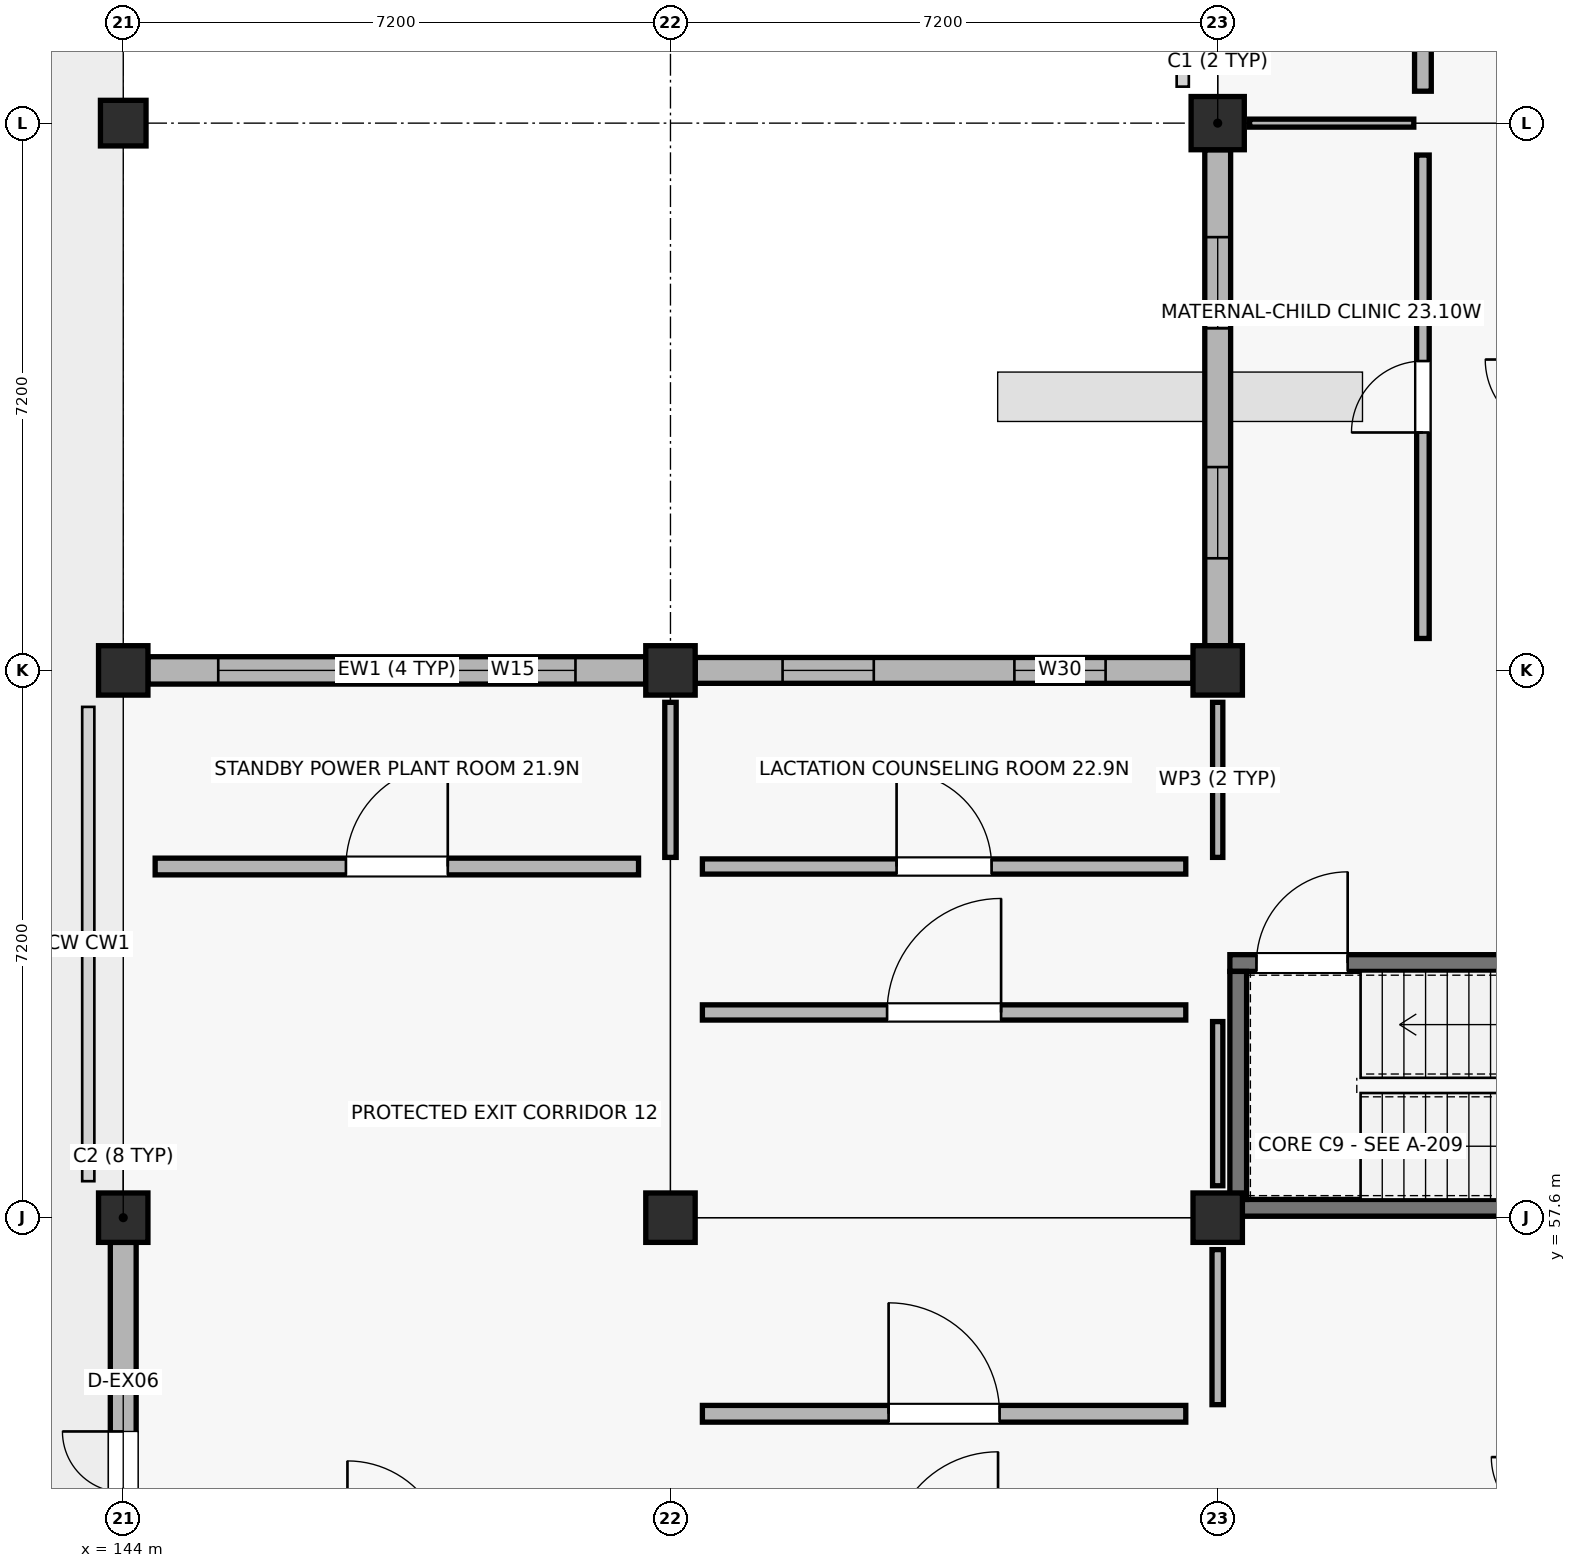
"""IFC4 building model, lengths in metres.
Left out: names, types, materials, properties, quantities, classifications, styles, units other than length and angle.
Written with IfcOpenShell. Run it as: python <this file> out.ifc"""

import sys

from ifc_helpers import new_model, si_unit, direction, frame, frame_2d, origin, origin_2d, place, context, subcontext, project, spatial, rectangle, extrude, element, fill, save


model = new_model("IFC4")
c1 = context("Model", 3, precision=1e-05, world=origin(), true_north=direction((0.0, 1.0)))
c2 = subcontext(c1, "Body", "Model", "MODEL_VIEW")
j1 = project(units=[si_unit("LENGTHUNIT", "METRE"), si_unit("PLANEANGLEUNIT", "RADIAN")], contexts=[c1])
p1 = place(None, origin())
s1 = spatial("IfcSite", under=j1, at=p1, CompositionType="ELEMENT")
p2 = place(p1, origin())
s2 = spatial("IfcBuilding", under=s1, at=p2, CompositionType="ELEMENT")
p3 = place(p2, origin())
s3 = spatial("IfcBuildingStorey", under=s2, at=p3, CompositionType="ELEMENT", Elevation=0.0)
for number, where, z_axis, x_axis in (
    (1, (144.0, 57.6, -0.25), (0.0, 0.0, 1.0), (1.0, 0.0, 0.0)),
    (2, (144.0, 64.8, -0.25), (0.0, 0.0, 1.0), (1.0, 0.0, 0.0)),
):
    element("IfcColumn", number, at=place(p3, frame(where, z_axis=z_axis, x_axis=x_axis)), inside=s3, PredefinedType="COLUMN", context=c2, shape_type="SweptSolid", body=[
        extrude(rectangle(XDim=0.65, YDim=0.65, at=origin_2d()), origin(), (0.0, 0.0, 1.0), 4.75),
    ])
p4 = place(p3, frame((144.0, 72.0, -0.25), z_axis=(0.0, 0.0, 1.0), x_axis=(1.0, 0.0, 0.0)))
e3 = element("IfcColumn", 3, at=p4, inside=s3, PredefinedType="COLUMN", context=c2, shape_type="SweptSolid", body=[
    extrude(rectangle(XDim=0.6, YDim=0.6, at=origin_2d()), origin(), (0.0, 0.0, 1.0), 4.75),
])
for number, where, z_axis, x_axis in (
    (4, (151.2, 57.6, -0.25), (0.0, 0.0, 1.0), (1.0, 0.0, 0.0)),
    (5, (151.2, 64.8, -0.25), (0.0, 0.0, 1.0), (1.0, 0.0, 0.0)),
    (6, (158.4, 57.6, -0.25), (0.0, 0.0, 1.0), (1.0, 0.0, 0.0)),
    (7, (158.4, 64.8, -0.25), (0.0, 0.0, 1.0), (1.0, 0.0, 0.0)),
):
    element("IfcColumn", number, at=place(p3, frame(where, z_axis=z_axis, x_axis=x_axis)), inside=s3, PredefinedType="COLUMN", context=c2, shape_type="SweptSolid", body=[
        extrude(rectangle(XDim=0.65, YDim=0.65, at=origin_2d()), origin(), (0.0, 0.0, 1.0), 4.75),
    ])
p5 = place(p3, frame((158.4, 72.0, -0.25), z_axis=(0.0, 0.0, 1.0), x_axis=(1.0, 0.0, 0.0)))
e8 = element("IfcColumn", 8, at=p5, inside=s3, PredefinedType="COLUMN", context=c2, shape_type="SweptSolid", body=[
    extrude(rectangle(XDim=0.7, YDim=0.7, at=origin_2d()), origin(), (0.0, 0.0, 1.0), 4.75),
])
p6 = place(p3, frame((144.0, 50.7, 0.0), z_axis=(0.0, 0.0, 1.0), x_axis=(0.0, 1.0, 0.0)))
e9 = element("IfcWall", 9, at=p6, inside=s3, PredefinedType="SOLIDWALL", context=c2, shape_type="SweptSolid", body=[
    extrude(rectangle(XDim=6.575, YDim=0.34, at=frame_2d((3.288, 0.0))), origin(), (0.0, 0.0, 1.0), 3.52),
])
p7 = place(p6, frame((2.488, 0.0, 0.0)))
e10 = element("IfcOpeningElement", 10, at=p7, cuts=e9, PredefinedType="OPENING", context=c2, shape_type="SweptSolid", body=[
    extrude(rectangle(XDim=1.6, YDim=2.25, at=frame_2d((0.8, 1.125))), frame((0.0, 0.18, 0.0), z_axis=(0.0, -1.0, 0.0), x_axis=(1.0, 0.0, 0.0)), (0.0, 0.0, 1.0), 0.36),
])
p8 = place(p3, frame((150.875, 64.8, 0.0), z_axis=(0.0, 0.0, 1.0), x_axis=(-1.0, 0.0, 0.0)))
e11 = element("IfcWall", 11, at=p8, inside=s3, PredefinedType="SOLIDWALL", context=c2, shape_type="SweptSolid", body=[
    extrude(rectangle(XDim=6.55, YDim=0.36, at=frame_2d((3.275, 0.0))), origin(), (0.0, 0.0, 1.0), 3.47),
])
p9 = place(p8, frame((0.925, 0.0, 0.9)))
e12 = element("IfcOpeningElement", 12, at=p9, cuts=e11, PredefinedType="OPENING", context=c2, shape_type="SweptSolid", body=[
    extrude(rectangle(XDim=1.65, YDim=1.38, at=frame_2d((0.825, 0.69))), frame((0.0, 0.19, 0.0), z_axis=(0.0, -1.0, 0.0), x_axis=(1.0, 0.0, 0.0)), (0.0, 0.0, 1.0), 0.38),
])
p10 = place(p8, frame((3.975, 0.0, 0.9)))
e13 = element("IfcOpeningElement", 13, at=p10, cuts=e11, PredefinedType="OPENING", context=c2, shape_type="SweptSolid", body=[
    extrude(rectangle(XDim=1.65, YDim=1.38, at=frame_2d((0.825, 0.69))), frame((0.0, 0.19, 0.0), z_axis=(0.0, -1.0, 0.0), x_axis=(1.0, 0.0, 0.0)), (0.0, 0.0, 1.0), 0.38),
])
p11 = place(p3, frame((158.075, 64.8, 0.0), z_axis=(0.0, 0.0, 1.0), x_axis=(-1.0, 0.0, 0.0)))
e14 = element("IfcWall", 14, at=p11, inside=s3, PredefinedType="SOLIDWALL", context=c2, shape_type="SweptSolid", body=[
    extrude(rectangle(XDim=6.55, YDim=0.34, at=frame_2d((3.275, 0.0))), origin(), (0.0, 0.0, 1.0), 3.47),
])
p12 = place(p11, frame((1.15, 0.0, 0.9)))
e15 = element("IfcOpeningElement", 15, at=p12, cuts=e14, PredefinedType="OPENING", context=c2, shape_type="SweptSolid", body=[
    extrude(rectangle(XDim=1.2, YDim=1.62, at=frame_2d((0.6, 0.81))), frame((0.0, 0.18, 0.0), z_axis=(0.0, -1.0, 0.0), x_axis=(1.0, 0.0, 0.0)), (0.0, 0.0, 1.0), 0.36),
])
p13 = place(p11, frame((4.2, 0.0, 0.9)))
e16 = element("IfcOpeningElement", 16, at=p13, cuts=e14, PredefinedType="OPENING", context=c2, shape_type="SweptSolid", body=[
    extrude(rectangle(XDim=1.2, YDim=1.62, at=frame_2d((0.6, 0.81))), frame((0.0, 0.18, 0.0), z_axis=(0.0, -1.0, 0.0), x_axis=(1.0, 0.0, 0.0)), (0.0, 0.0, 1.0), 0.36),
])
p14 = place(p3, frame((158.4, 71.65, 0.0), z_axis=(0.0, 0.0, 1.0), x_axis=(0.0, -1.0, 0.0)))
e17 = element("IfcWall", 17, at=p14, inside=s3, PredefinedType="SOLIDWALL", context=c2, shape_type="SweptSolid", body=[
    extrude(rectangle(XDim=6.525, YDim=0.34, at=frame_2d((3.262, 0.0))), origin(), (0.0, 0.0, 1.0), 3.52),
])
p15 = place(p14, frame((1.15, 0.0, 0.9)))
e18 = element("IfcOpeningElement", 18, at=p15, cuts=e17, PredefinedType="OPENING", context=c2, shape_type="SweptSolid", body=[
    extrude(rectangle(XDim=1.2, YDim=1.38, at=frame_2d((0.6, 0.69))), frame((0.0, 0.18, 0.0), z_axis=(0.0, -1.0, 0.0), x_axis=(1.0, 0.0, 0.0)), (0.0, 0.0, 1.0), 0.36),
])
p16 = place(p14, frame((4.175, 0.0, 0.9)))
e19 = element("IfcOpeningElement", 19, at=p16, cuts=e17, PredefinedType="OPENING", context=c2, shape_type="SweptSolid", body=[
    extrude(rectangle(XDim=1.2, YDim=1.38, at=frame_2d((0.6, 0.69))), frame((0.0, 0.18, 0.0), z_axis=(0.0, -1.0, 0.0), x_axis=(1.0, 0.0, 0.0)), (0.0, 0.0, 1.0), 0.36),
])
p17 = place(p3, frame((158.56, 57.73, -0.25), z_axis=(0.0, 0.0, 1.0), x_axis=(1.0, 0.0, 0.0)))
e20 = element("IfcWall", 20, at=p17, inside=s3, PredefinedType="SHEAR", context=c2, shape_type="SweptSolid", body=[
    extrude(rectangle(XDim=6.88, YDim=0.22, at=frame_2d((3.44, 0.0))), origin(), (0.0, 0.0, 1.0), 4.47),
])
p18 = place(p3, frame((158.56, 60.95, -0.25), z_axis=(0.0, 0.0, 1.0), x_axis=(1.0, 0.0, 0.0)))
e21 = element("IfcWall", 21, at=p18, inside=s3, PredefinedType="SHEAR", context=c2, shape_type="SweptSolid", body=[
    extrude(rectangle(XDim=6.88, YDim=0.22, at=frame_2d((3.44, 0.0))), origin(), (0.0, 0.0, 1.0), 4.47),
])
p19 = place(p18, frame((0.35, 0.0, 0.25)))
e22 = element("IfcOpeningElement", 22, at=p19, cuts=e21, PredefinedType="OPENING", context=c2, shape_type="SweptSolid", body=[
    extrude(rectangle(XDim=1.2, YDim=2.15, at=frame_2d((0.6, 1.075))), frame((0.0, 0.12, 0.0), z_axis=(0.0, -1.0, 0.0), x_axis=(1.0, 0.0, 0.0)), (0.0, 0.0, 1.0), 0.24),
])
p20 = place(p3, frame((158.67, 57.84, -0.25), z_axis=(0.0, 0.0, 1.0), x_axis=(0.0, 1.0, 0.0)))
e23 = element("IfcWall", 23, at=p20, inside=s3, PredefinedType="SHEAR", context=c2, shape_type="SweptSolid", body=[
    extrude(rectangle(XDim=3.0, YDim=0.22, at=frame_2d((1.5, 0.0))), origin(), (0.0, 0.0, 1.0), 4.47),
])
p21 = place(p3, frame((144.42, 62.22, 0.0), z_axis=(0.0, 0.0, 1.0), x_axis=(1.0, 0.0, 0.0)))
e24 = element("IfcWall", 24, at=p21, inside=s3, PredefinedType="SOLIDWALL", context=c2, shape_type="SweptSolid", body=[
    extrude(rectangle(XDim=6.36, YDim=0.22, at=frame_2d((3.18, 0.0))), origin(), (0.0, 0.0, 1.0), 3.36),
])
p22 = place(p21, frame((2.51, 0.0, 0.0)))
e25 = element("IfcOpeningElement", 25, at=p22, cuts=e24, PredefinedType="OPENING", context=c2, shape_type="SweptSolid", body=[
    extrude(rectangle(XDim=1.34, YDim=2.19, at=frame_2d((0.67, 1.095))), frame((0.0, 0.12, 0.0), z_axis=(0.0, -1.0, 0.0), x_axis=(1.0, 0.0, 0.0)), (0.0, 0.0, 1.0), 0.24),
])
p23 = place(p3, frame((151.2, 62.34, 0.0), z_axis=(0.0, 0.0, 1.0), x_axis=(0.0, 1.0, 0.0)))
e26 = element("IfcWall", 26, at=p23, inside=s3, PredefinedType="PARTITIONING", context=c2, shape_type="SweptSolid", body=[
    extrude(rectangle(XDim=2.04, YDim=0.15, at=frame_2d((1.02, 0.0))), origin(), (0.0, 0.0, 1.0), 3.36),
])
p24 = place(p3, frame((151.62, 55.02, 0.0), z_axis=(0.0, 0.0, 1.0), x_axis=(1.0, 0.0, 0.0)))
e27 = element("IfcWall", 27, at=p24, inside=s3, PredefinedType="SOLIDWALL", context=c2, shape_type="SweptSolid", body=[
    extrude(rectangle(XDim=6.36, YDim=0.22, at=frame_2d((3.18, 0.0))), origin(), (0.0, 0.0, 1.0), 3.36),
])
p25 = place(p24, frame((2.45, 0.0, 0.0)))
e28 = element("IfcOpeningElement", 28, at=p25, cuts=e27, PredefinedType="OPENING", context=c2, shape_type="SweptSolid", body=[
    extrude(rectangle(XDim=1.46, YDim=2.19, at=frame_2d((0.73, 1.095))), frame((0.0, 0.12, 0.0), z_axis=(0.0, -1.0, 0.0), x_axis=(1.0, 0.0, 0.0)), (0.0, 0.0, 1.0), 0.24),
])
p26 = place(p3, frame((158.4, 55.14, 0.0), z_axis=(0.0, 0.0, 1.0), x_axis=(0.0, 1.0, 0.0)))
e29 = element("IfcWall", 29, at=p26, inside=s3, PredefinedType="PARTITIONING", context=c2, shape_type="SweptSolid", body=[
    extrude(rectangle(XDim=2.04, YDim=0.15, at=frame_2d((1.02, 0.0))), origin(), (0.0, 0.0, 1.0), 3.36),
])
p27 = place(p3, frame((151.62, 60.3, 0.0), z_axis=(0.0, 0.0, 1.0), x_axis=(1.0, 0.0, 0.0)))
e30 = element("IfcWall", 30, at=p27, inside=s3, PredefinedType="SOLIDWALL", context=c2, shape_type="SweptSolid", body=[
    extrude(rectangle(XDim=6.36, YDim=0.2, at=frame_2d((3.18, 0.0))), origin(), (0.0, 0.0, 1.0), 3.36),
])
p28 = place(p27, frame((2.43, 0.0, 0.0)))
e31 = element("IfcOpeningElement", 31, at=p28, cuts=e30, PredefinedType="OPENING", context=c2, shape_type="SweptSolid", body=[
    extrude(rectangle(XDim=1.5, YDim=2.19, at=frame_2d((0.75, 1.095))), frame((0.0, 0.11, 0.0), z_axis=(0.0, -1.0, 0.0), x_axis=(1.0, 0.0, 0.0)), (0.0, 0.0, 1.0), 0.22),
])
p29 = place(p3, frame((158.4, 58.02, 0.0), z_axis=(0.0, 0.0, 1.0), x_axis=(0.0, 1.0, 0.0)))
e32 = element("IfcWall", 32, at=p29, inside=s3, PredefinedType="PARTITIONING", context=c2, shape_type="SweptSolid", body=[
    extrude(rectangle(XDim=2.16, YDim=0.135, at=frame_2d((1.08, 0.0))), origin(), (0.0, 0.0, 1.0), 3.36),
])
p30 = place(p3, frame((151.62, 62.22, 0.0), z_axis=(0.0, 0.0, 1.0), x_axis=(1.0, 0.0, 0.0)))
e33 = element("IfcWall", 33, at=p30, inside=s3, PredefinedType="SOLIDWALL", context=c2, shape_type="SweptSolid", body=[
    extrude(rectangle(XDim=6.36, YDim=0.2, at=frame_2d((3.18, 0.0))), origin(), (0.0, 0.0, 1.0), 3.36),
])
p31 = place(p30, frame((2.555, 0.0, 0.0)))
e34 = element("IfcOpeningElement", 34, at=p31, cuts=e33, PredefinedType="OPENING", context=c2, shape_type="SweptSolid", body=[
    extrude(rectangle(XDim=1.25, YDim=2.15, at=frame_2d((0.625, 1.075))), frame((0.0, 0.11, 0.0), z_axis=(0.0, -1.0, 0.0), x_axis=(1.0, 0.0, 0.0)), (0.0, 0.0, 1.0), 0.22),
])
p32 = place(p3, frame((158.4, 62.34, 0.0), z_axis=(0.0, 0.0, 1.0), x_axis=(0.0, 1.0, 0.0)))
e35 = element("IfcWall", 35, at=p32, inside=s3, PredefinedType="PARTITIONING", context=c2, shape_type="SweptSolid", body=[
    extrude(rectangle(XDim=2.04, YDim=0.135, at=frame_2d((1.02, 0.0))), origin(), (0.0, 0.0, 1.0), 3.36),
])
p33 = place(p3, frame((161.1, 65.22, 0.0), z_axis=(0.0, 0.0, 1.0), x_axis=(0.0, 1.0, 0.0)))
e36 = element("IfcWall", 36, at=p33, inside=s3, PredefinedType="PARTITIONING", context=c2, shape_type="SweptSolid", body=[
    extrude(rectangle(XDim=6.36, YDim=0.165, at=frame_2d((3.18, 0.0))), origin(), (0.0, 0.0, 1.0), 3.36),
])
p34 = place(p33, frame((2.71, 0.0, 0.0)))
e37 = element("IfcOpeningElement", 37, at=p34, cuts=e36, PredefinedType="OPENING", context=c2, shape_type="SweptSolid", body=[
    extrude(rectangle(XDim=0.94, YDim=2.04, at=frame_2d((0.47, 1.02))), frame((0.0, 0.093, 0.0), z_axis=(0.0, -1.0, 0.0), x_axis=(1.0, 0.0, 0.0)), (0.0, 0.0, 1.0), 0.185),
])
p35 = place(p3, frame((158.82, 72.0, 0.0), z_axis=(0.0, 0.0, 1.0), x_axis=(1.0, 0.0, 0.0)))
e38 = element("IfcWall", 38, at=p35, inside=s3, PredefinedType="PARTITIONING", context=c2, shape_type="SweptSolid", body=[
    extrude(rectangle(XDim=2.16, YDim=0.105, at=frame_2d((1.08, 0.0))), origin(), (0.0, 0.0, 1.0), 3.36),
])
p36 = place(p3, frame((161.1, 72.42, 0.0), z_axis=(0.0, 0.0, 1.0), x_axis=(0.0, 1.0, 0.0)))
e39 = element("IfcWall", 39, at=p36, inside=s3, PredefinedType="SOLIDWALL", context=c2, shape_type="SweptSolid", body=[
    extrude(rectangle(XDim=6.36, YDim=0.22, at=frame_2d((3.18, 0.0))), origin(), (0.0, 0.0, 1.0), 3.36),
])
p37 = place(p36, frame((2.67, 0.0, 0.0)))
e40 = element("IfcOpeningElement", 40, at=p37, cuts=e39, PredefinedType="OPENING", context=c2, shape_type="SweptSolid", body=[
    extrude(rectangle(XDim=1.02, YDim=2.04, at=frame_2d((0.51, 1.02))), frame((0.0, 0.12, 0.0), z_axis=(0.0, -1.0, 0.0), x_axis=(1.0, 0.0, 0.0)), (0.0, 0.0, 1.0), 0.24),
])
p38 = place(p7, origin())
e41 = element("IfcDoor", 41, at=p38, inside=s3, OperationType="DOUBLE_DOOR_SINGLE_SWING", PredefinedType="DOOR", context=c2, shape_type="SweptSolid", body=[
    extrude(rectangle(XDim=1.6, YDim=2.25, at=frame_2d((0.8, 1.125))), frame((0.0, 0.025, 0.0), z_axis=(0.0, -1.0, 0.0), x_axis=(1.0, 0.0, 0.0)), (0.0, 0.0, 1.0), 0.05),
])
fill(e10, e41)
p39 = place(p9, origin())
e42 = element("IfcWindow", 42, at=p39, inside=s3, PartitioningType="SINGLE_PANEL", PredefinedType="WINDOW", context=c2, shape_type="SweptSolid", body=[
    extrude(rectangle(XDim=1.65, YDim=1.38, at=frame_2d((0.825, 0.69))), frame((0.0, 0.03, 0.0), z_axis=(0.0, -1.0, 0.0), x_axis=(1.0, 0.0, 0.0)), (0.0, 0.0, 1.0), 0.06),
])
fill(e12, e42)
p40 = place(p10, origin())
e43 = element("IfcWindow", 43, at=p40, inside=s3, PartitioningType="SINGLE_PANEL", PredefinedType="WINDOW", context=c2, shape_type="SweptSolid", body=[
    extrude(rectangle(XDim=1.65, YDim=1.38, at=frame_2d((0.825, 0.69))), frame((0.0, 0.03, 0.0), z_axis=(0.0, -1.0, 0.0), x_axis=(1.0, 0.0, 0.0)), (0.0, 0.0, 1.0), 0.06),
])
fill(e13, e43)
p41 = place(p12, origin())
e44 = element("IfcWindow", 44, at=p41, inside=s3, PartitioningType="SINGLE_PANEL", PredefinedType="WINDOW", context=c2, shape_type="SweptSolid", body=[
    extrude(rectangle(XDim=1.2, YDim=1.62, at=frame_2d((0.6, 0.81))), frame((0.0, 0.03, 0.0), z_axis=(0.0, -1.0, 0.0), x_axis=(1.0, 0.0, 0.0)), (0.0, 0.0, 1.0), 0.06),
])
fill(e15, e44)
p42 = place(p13, origin())
e45 = element("IfcWindow", 45, at=p42, inside=s3, PartitioningType="SINGLE_PANEL", PredefinedType="WINDOW", context=c2, shape_type="SweptSolid", body=[
    extrude(rectangle(XDim=1.2, YDim=1.62, at=frame_2d((0.6, 0.81))), frame((0.0, 0.03, 0.0), z_axis=(0.0, -1.0, 0.0), x_axis=(1.0, 0.0, 0.0)), (0.0, 0.0, 1.0), 0.06),
])
fill(e16, e45)
p43 = place(p15, origin())
e46 = element("IfcWindow", 46, at=p43, inside=s3, PartitioningType="SINGLE_PANEL", PredefinedType="WINDOW", context=c2, shape_type="SweptSolid", body=[
    extrude(rectangle(XDim=1.2, YDim=1.38, at=frame_2d((0.6, 0.69))), frame((0.0, 0.03, 0.0), z_axis=(0.0, -1.0, 0.0), x_axis=(1.0, 0.0, 0.0)), (0.0, 0.0, 1.0), 0.06),
])
fill(e18, e46)
p44 = place(p16, origin())
e47 = element("IfcWindow", 47, at=p44, inside=s3, PartitioningType="SINGLE_PANEL", PredefinedType="WINDOW", context=c2, shape_type="SweptSolid", body=[
    extrude(rectangle(XDim=1.2, YDim=1.38, at=frame_2d((0.6, 0.69))), frame((0.0, 0.03, 0.0), z_axis=(0.0, -1.0, 0.0), x_axis=(1.0, 0.0, 0.0)), (0.0, 0.0, 1.0), 0.06),
])
fill(e19, e47)
p45 = place(p19, origin())
e48 = element("IfcDoor", 48, at=p45, inside=s3, OperationType="SINGLE_SWING_RIGHT", PredefinedType="DOOR", context=c2, shape_type="SweptSolid", body=[
    extrude(rectangle(XDim=1.2, YDim=2.15, at=frame_2d((0.6, 1.075))), frame((0.0, 0.025, 0.0), z_axis=(0.0, -1.0, 0.0), x_axis=(1.0, 0.0, 0.0)), (0.0, 0.0, 1.0), 0.05),
])
fill(e22, e48)
p46 = place(p22, origin())
e49 = element("IfcDoor", 49, at=p46, inside=s3, OperationType="SINGLE_SWING_RIGHT", PredefinedType="DOOR", context=c2, shape_type="SweptSolid", body=[
    extrude(rectangle(XDim=1.34, YDim=2.19, at=frame_2d((0.67, 1.095))), frame((0.0, 0.025, 0.0), z_axis=(0.0, -1.0, 0.0), x_axis=(1.0, 0.0, 0.0)), (0.0, 0.0, 1.0), 0.05),
])
fill(e25, e49)
p47 = place(p25, origin())
e50 = element("IfcDoor", 50, at=p47, inside=s3, OperationType="SINGLE_SWING_LEFT", PredefinedType="DOOR", context=c2, shape_type="SweptSolid", body=[
    extrude(rectangle(XDim=1.46, YDim=2.19, at=frame_2d((0.73, 1.095))), frame((0.0, 0.025, 0.0), z_axis=(0.0, -1.0, 0.0), x_axis=(1.0, 0.0, 0.0)), (0.0, 0.0, 1.0), 0.05),
])
fill(e28, e50)
p48 = place(p28, origin())
e51 = element("IfcDoor", 51, at=p48, inside=s3, OperationType="SINGLE_SWING_RIGHT", PredefinedType="DOOR", context=c2, shape_type="SweptSolid", body=[
    extrude(rectangle(XDim=1.5, YDim=2.19, at=frame_2d((0.75, 1.095))), frame((0.0, 0.025, 0.0), z_axis=(0.0, -1.0, 0.0), x_axis=(1.0, 0.0, 0.0)), (0.0, 0.0, 1.0), 0.05),
])
fill(e31, e51)
p49 = place(p31, origin())
e52 = element("IfcDoor", 52, at=p49, inside=s3, OperationType="SINGLE_SWING_LEFT", PredefinedType="DOOR", context=c2, shape_type="SweptSolid", body=[
    extrude(rectangle(XDim=1.25, YDim=2.15, at=frame_2d((0.625, 1.075))), frame((0.0, 0.025, 0.0), z_axis=(0.0, -1.0, 0.0), x_axis=(1.0, 0.0, 0.0)), (0.0, 0.0, 1.0), 0.05),
])
fill(e34, e52)
p50 = place(p34, origin())
e53 = element("IfcDoor", 53, at=p50, inside=s3, OperationType="SINGLE_SWING_LEFT", PredefinedType="DOOR", context=c2, shape_type="SweptSolid", body=[
    extrude(rectangle(XDim=0.94, YDim=2.04, at=frame_2d((0.47, 1.02))), frame((0.0, 0.025, 0.0), z_axis=(0.0, -1.0, 0.0), x_axis=(1.0, 0.0, 0.0)), (0.0, 0.0, 1.0), 0.05),
])
fill(e37, e53)
save(model, sys.argv[1])
